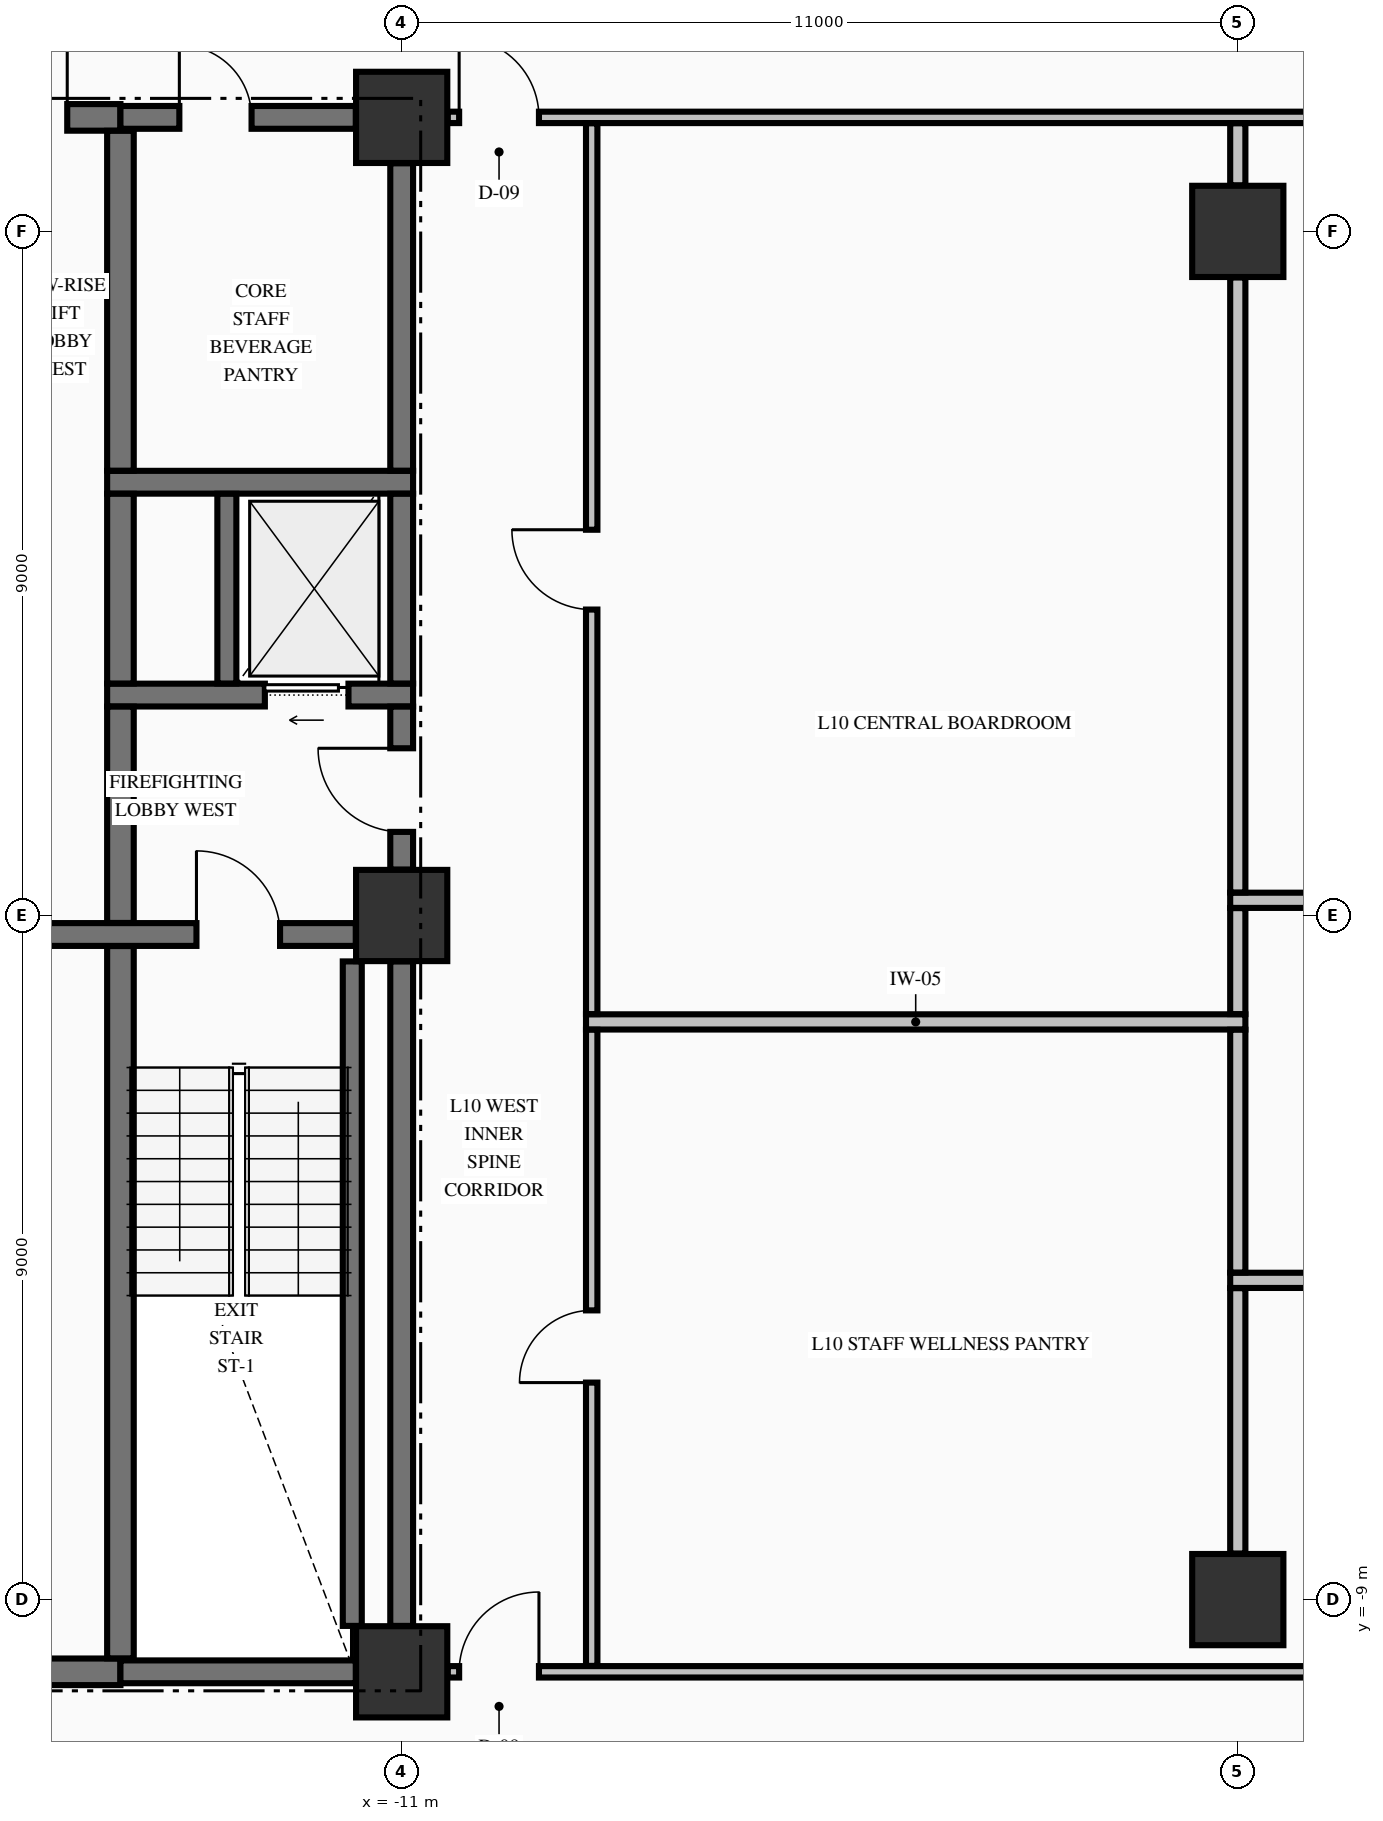
"""IFC4 building model, lengths in metres.
Left out: names, types, materials, properties, quantities, classifications, styles, units other than length and angle.
Written with IfcOpenShell. Run it as: python <this file> out.ifc"""

import sys

from ifc_helpers import new_model, si_unit, direction, frame, frame_2d, origin, origin_2d, place, context, subcontext, project, spatial, rectangle, extrude, element, fill, save


model = new_model("IFC4")
c1 = context("Model", 3, precision=1e-05, world=origin(), true_north=direction((0.0, 1.0)))
c2 = subcontext(c1, "Body", "Model", "MODEL_VIEW")
j1 = project(units=[si_unit("LENGTHUNIT", "METRE"), si_unit("PLANEANGLEUNIT", "RADIAN")], contexts=[c1])
p1 = place(None, origin())
s1 = spatial("IfcSite", under=j1, at=p1, CompositionType="ELEMENT")
p2 = place(p1, origin())
s2 = spatial("IfcBuilding", under=s1, at=p2, CompositionType="ELEMENT")
p3 = place(p2, frame((0.0, 0.0, 45.05)))
s3 = spatial("IfcBuildingStorey", under=s2, at=p3, CompositionType="ELEMENT", Elevation=45.05)
for number, where, z_axis, x_axis in (
    (1, (-11.0, -9.95, -0.25), (0.0, 0.0, 1.0), (1.0, 0.0, 0.0)),
    (2, (-11.0, 0.0, -0.25), (0.0, 0.0, 1.0), (1.0, 0.0, 0.0)),
    (3, (-11.0, 10.5, -0.25), (0.0, 0.0, 1.0), (1.0, 0.0, 0.0)),
    (4, (0.0, -9.0, -0.25), (0.0, 0.0, 1.0), (1.0, 0.0, 0.0)),
    (5, (0.0, 9.0, -0.25), (0.0, 0.0, 1.0), (1.0, 0.0, 0.0)),
):
    element("IfcColumn", number, at=place(p3, frame(where, z_axis=z_axis, x_axis=x_axis)), inside=s3, PredefinedType="COLUMN", context=c2, shape_type="SweptSolid", body=[
        extrude(rectangle(XDim=1.2, YDim=1.2, at=origin_2d()), origin(), (0.0, 0.0, 1.0), 3.57),
    ])
p4 = place(p3, frame((-19.396, -9.95, 0.0), z_axis=(0.0, 0.0, 1.0), x_axis=(1.0, 0.0, 0.0)))
e6 = element("IfcWall", 6, at=p4, inside=s3, PredefinedType="SHEAR", context=c2, shape_type="SweptSolid", body=[
    extrude(rectangle(XDim=4.696, YDim=0.35, at=frame_2d((2.348, 0.0))), origin(), (0.0, 0.0, 1.0), 3.32),
])
p5 = place(p4, frame((0.571, 0.0, 0.0)))
e7 = element("IfcOpeningElement", 7, at=p5, cuts=e6, PredefinedType="OPENING", context=c2, shape_type="SweptSolid", body=[
    extrude(rectangle(XDim=1.05, YDim=2.15, at=frame_2d((0.525, 1.075))), frame((0.0, 0.185, 0.0), z_axis=(0.0, -1.0, 0.0), x_axis=(1.0, 0.0, 0.0)), (0.0, 0.0, 1.0), 0.37),
])
p6 = place(p3, frame((-14.7, -9.95, 0.0), z_axis=(0.0, 0.0, 1.0), x_axis=(1.0, 0.0, 0.0)))
e8 = element("IfcWall", 8, at=p6, inside=s3, PredefinedType="SHEAR", context=c2, shape_type="SweptSolid", body=[
    extrude(rectangle(XDim=3.096, YDim=0.3, at=frame_2d((1.548, 0.0))), origin(), (0.0, 0.0, 1.0), 3.32),
])
p7 = place(p3, frame((-19.396, -0.25, 0.0), z_axis=(0.0, 0.0, 1.0), x_axis=(1.0, 0.0, 0.0)))
e9 = element("IfcWall", 9, at=p7, inside=s3, PredefinedType="SHEAR", context=c2, shape_type="SweptSolid", body=[
    extrude(rectangle(XDim=7.792, YDim=0.3, at=frame_2d((3.896, 0.0))), origin(), (0.0, 0.0, 1.0), 3.32),
])
p8 = place(p7, frame((5.696, 0.0, 0.0)))
e10 = element("IfcOpeningElement", 10, at=p8, cuts=e9, PredefinedType="OPENING", context=c2, shape_type="SweptSolid", body=[
    extrude(rectangle(XDim=1.1, YDim=2.15, at=frame_2d((0.55, 1.075))), frame((0.0, 0.16, 0.0), z_axis=(0.0, -1.0, 0.0), x_axis=(1.0, 0.0, 0.0)), (0.0, 0.0, 1.0), 0.32),
])
p9 = place(p3, frame((-14.875, 2.9, 0.0), z_axis=(0.0, 0.0, 1.0), x_axis=(1.0, 0.0, 0.0)))
e11 = element("IfcWall", 11, at=p9, inside=s3, PredefinedType="SHEAR", context=c2, shape_type="SweptSolid", body=[
    extrude(rectangle(XDim=4.025, YDim=0.3, at=frame_2d((2.012, 0.0))), origin(), (0.0, 0.0, 1.0), 3.32),
])
p10 = place(p9, frame((2.075, 0.0, 0.0)))
e12 = element("IfcOpeningElement", 12, at=p10, cuts=e11, PredefinedType="OPENING", context=c2, shape_type="SweptSolid", body=[
    extrude(rectangle(XDim=1.1, YDim=2.2, at=frame_2d((0.55, 1.1))), frame((0.0, 0.16, 0.0), z_axis=(0.0, -1.0, 0.0), x_axis=(1.0, 0.0, 0.0)), (0.0, 0.0, 1.0), 0.32),
])
p11 = place(p3, frame((-14.875, 5.7, 0.0), z_axis=(0.0, 0.0, 1.0), x_axis=(1.0, 0.0, 0.0)))
e13 = element("IfcWall", 13, at=p11, inside=s3, PredefinedType="SHEAR", context=c2, shape_type="SweptSolid", body=[
    extrude(rectangle(XDim=4.025, YDim=0.3, at=frame_2d((2.012, 0.0))), origin(), (0.0, 0.0, 1.0), 3.32),
])
p12 = place(p3, frame((-19.396, 10.5, 0.0), z_axis=(0.0, 0.0, 1.0), x_axis=(1.0, 0.0, 0.0)))
e14 = element("IfcWall", 14, at=p12, inside=s3, PredefinedType="SHEAR", context=c2, shape_type="SweptSolid", body=[
    extrude(rectangle(XDim=4.696, YDim=0.35, at=frame_2d((2.348, 0.0))), origin(), (0.0, 0.0, 1.0), 3.32),
])
p13 = place(p12, frame((2.796, 0.0, 0.0)))
e15 = element("IfcOpeningElement", 15, at=p13, cuts=e14, PredefinedType="OPENING", context=c2, shape_type="SweptSolid", body=[
    extrude(rectangle(XDim=1.2, YDim=2.15, at=frame_2d((0.6, 1.075))), frame((0.0, 0.185, 0.0), z_axis=(0.0, -1.0, 0.0), x_axis=(1.0, 0.0, 0.0)), (0.0, 0.0, 1.0), 0.37),
])
p14 = place(p3, frame((-14.7, 10.5, 0.0), z_axis=(0.0, 0.0, 1.0), x_axis=(1.0, 0.0, 0.0)))
e16 = element("IfcWall", 16, at=p14, inside=s3, PredefinedType="SHEAR", context=c2, shape_type="SweptSolid", body=[
    extrude(rectangle(XDim=3.096, YDim=0.3, at=frame_2d((1.548, 0.0))), origin(), (0.0, 0.0, 1.0), 3.32),
])
p15 = place(p14, frame((0.775, 0.0, 0.0)))
e17 = element("IfcOpeningElement", 17, at=p15, cuts=e16, PredefinedType="OPENING", context=c2, shape_type="SweptSolid", body=[
    extrude(rectangle(XDim=0.95, YDim=2.15, at=frame_2d((0.475, 1.075))), frame((0.0, 0.16, 0.0), z_axis=(0.0, -1.0, 0.0), x_axis=(1.0, 0.0, 0.0)), (0.0, 0.0, 1.0), 0.32),
])
p16 = place(p3, frame((-10.394, -9.95, 0.0), z_axis=(0.0, 0.0, 1.0), x_axis=(1.0, 0.0, 0.0)))
e18 = element("IfcWall", 18, at=p16, inside=s3, PredefinedType="PARTITIONING", context=c2, shape_type="SweptSolid", body=[
    extrude(rectangle(XDim=20.788, YDim=0.15, at=frame_2d((10.394, 0.0))), origin(), (0.0, 0.0, 1.0), 3.32),
])
p17 = place(p16, frame((0.15, 0.0, 0.0)))
e19 = element("IfcOpeningElement", 19, at=p17, cuts=e18, PredefinedType="OPENING", context=c2, shape_type="SweptSolid", body=[
    extrude(rectangle(XDim=1.05, YDim=2.15, at=frame_2d((0.525, 1.075))), frame((0.0, 0.085, 0.0), z_axis=(0.0, -1.0, 0.0), x_axis=(1.0, 0.0, 0.0)), (0.0, 0.0, 1.0), 0.17),
])
p18 = place(p16, frame((19.588, 0.0, 0.0)))
e20 = element("IfcOpeningElement", 20, at=p18, cuts=e18, PredefinedType="OPENING", context=c2, shape_type="SweptSolid", body=[
    extrude(rectangle(XDim=1.05, YDim=2.15, at=frame_2d((0.525, 1.075))), frame((0.0, 0.085, 0.0), z_axis=(0.0, -1.0, 0.0), x_axis=(1.0, 0.0, 0.0)), (0.0, 0.0, 1.0), 0.17),
])
p19 = place(p16, frame((12.669, 0.0, 0.0)))
e21 = element("IfcOpeningElement", 21, at=p19, cuts=e18, PredefinedType="OPENING", context=c2, shape_type="SweptSolid", body=[
    extrude(rectangle(XDim=0.95, YDim=2.15, at=frame_2d((0.475, 1.075))), frame((0.0, 0.085, 0.0), z_axis=(0.0, -1.0, 0.0), x_axis=(1.0, 0.0, 0.0)), (0.0, 0.0, 1.0), 0.17),
])
for number, where, z_axis, x_axis in (
    (22, (-0.1, -4.8, 0.0), (0.0, 0.0, 1.0), (1.0, 0.0, 0.0)),
    (23, (-8.575, -1.4, 0.0), (0.0, 0.0, 1.0), (1.0, 0.0, 0.0)),
    (24, (-0.1, 0.2, 0.0), (0.0, 0.0, 1.0), (1.0, 0.0, 0.0)),
):
    element("IfcWall", number, at=place(p3, frame(where, z_axis=z_axis, x_axis=x_axis)), inside=s3, PredefinedType="PARTITIONING", context=c2, shape_type="SweptSolid", body=[
        extrude(rectangle(XDim=8.675, YDim=0.2, at=frame_2d((4.337, 0.0))), origin(), (0.0, 0.0, 1.0), 3.32),
    ])
p20 = place(p3, frame((-10.394, 10.5, 0.0), z_axis=(0.0, 0.0, 1.0), x_axis=(1.0, 0.0, 0.0)))
e25 = element("IfcWall", 25, at=p20, inside=s3, PredefinedType="PARTITIONING", context=c2, shape_type="SweptSolid", body=[
    extrude(rectangle(XDim=20.788, YDim=0.15, at=frame_2d((10.394, 0.0))), origin(), (0.0, 0.0, 1.0), 3.32),
])
p21 = place(p20, frame((0.15, 0.0, 0.0)))
e26 = element("IfcOpeningElement", 26, at=p21, cuts=e25, PredefinedType="OPENING", context=c2, shape_type="SweptSolid", body=[
    extrude(rectangle(XDim=1.05, YDim=2.15, at=frame_2d((0.525, 1.075))), frame((0.0, 0.085, 0.0), z_axis=(0.0, -1.0, 0.0), x_axis=(1.0, 0.0, 0.0)), (0.0, 0.0, 1.0), 0.17),
])
p22 = place(p20, frame((19.588, 0.0, 0.0)))
e27 = element("IfcOpeningElement", 27, at=p22, cuts=e25, PredefinedType="OPENING", context=c2, shape_type="SweptSolid", body=[
    extrude(rectangle(XDim=1.05, YDim=2.15, at=frame_2d((0.525, 1.075))), frame((0.0, 0.085, 0.0), z_axis=(0.0, -1.0, 0.0), x_axis=(1.0, 0.0, 0.0)), (0.0, 0.0, 1.0), 0.17),
])
p23 = place(p3, frame((-14.7, -9.773, 0.0), z_axis=(0.0, 0.0, 1.0), x_axis=(0.0, 1.0, 0.0)))
e28 = element("IfcWall", 28, at=p23, inside=s3, PredefinedType="SHEAR", context=c2, shape_type="SweptSolid", body=[
    extrude(rectangle(XDim=9.371, YDim=0.35, at=frame_2d((4.686, 0.0))), origin(), (0.0, 0.0, 1.0), 3.32),
])
p24 = place(p3, frame((-14.7, -0.098, 0.0), z_axis=(0.0, 0.0, 1.0), x_axis=(0.0, 1.0, 0.0)))
e29 = element("IfcWall", 29, at=p24, inside=s3, PredefinedType="SHEAR", context=c2, shape_type="SweptSolid", body=[
    extrude(rectangle(XDim=2.846, YDim=0.35, at=frame_2d((1.423, 0.0))), origin(), (0.0, 0.0, 1.0), 3.32),
])
p25 = place(p3, frame((-14.7, 3.052, 0.0), z_axis=(0.0, 0.0, 1.0), x_axis=(0.0, 1.0, 0.0)))
e30 = element("IfcWall", 30, at=p25, inside=s3, PredefinedType="SHEAR", context=c2, shape_type="SweptSolid", body=[
    extrude(rectangle(XDim=2.496, YDim=0.35, at=frame_2d((1.248, 0.0))), origin(), (0.0, 0.0, 1.0), 3.32),
])
p26 = place(p3, frame((-14.7, 5.852, 0.0), z_axis=(0.0, 0.0, 1.0), x_axis=(0.0, 1.0, 0.0)))
e31 = element("IfcWall", 31, at=p26, inside=s3, PredefinedType="SHEAR", context=c2, shape_type="SweptSolid", body=[
    extrude(rectangle(XDim=4.471, YDim=0.35, at=frame_2d((2.235, 0.0))), origin(), (0.0, 0.0, 1.0), 3.32),
])
p27 = place(p3, frame((-13.3, 3.052, 0.0), z_axis=(0.0, 0.0, 1.0), x_axis=(0.0, 1.0, 0.0)))
e32 = element("IfcWall", 32, at=p27, inside=s3, PredefinedType="SOLIDWALL", context=c2, shape_type="SweptSolid", body=[
    extrude(rectangle(XDim=2.496, YDim=0.25, at=frame_2d((1.248, 0.0))), origin(), (0.0, 0.0, 1.0), 3.32),
])
p28 = place(p3, frame((-11.65, -9.346, 0.0), z_axis=(0.0, 0.0, 1.0), x_axis=(0.0, 1.0, 0.0)))
e33 = element("IfcWall", 33, at=p28, inside=s3, PredefinedType="SOLIDWALL", context=c2, shape_type="SweptSolid", body=[
    extrude(rectangle(XDim=8.742, YDim=0.25, at=frame_2d((4.371, 0.0))), origin(), (0.0, 0.0, 1.0), 3.32),
])
p29 = place(p3, frame((-11.0, -9.346, 0.0), z_axis=(0.0, 0.0, 1.0), x_axis=(0.0, 1.0, 0.0)))
e34 = element("IfcWall", 34, at=p29, inside=s3, PredefinedType="SHEAR", context=c2, shape_type="SweptSolid", body=[
    extrude(rectangle(XDim=8.742, YDim=0.3, at=frame_2d((4.371, 0.0))), origin(), (0.0, 0.0, 1.0), 3.32),
])
p30 = place(p3, frame((-11.0, 0.604, 0.0), z_axis=(0.0, 0.0, 1.0), x_axis=(0.0, 1.0, 0.0)))
e35 = element("IfcWall", 35, at=p30, inside=s3, PredefinedType="SHEAR", context=c2, shape_type="SweptSolid", body=[
    extrude(rectangle(XDim=2.144, YDim=0.3, at=frame_2d((1.072, 0.0))), origin(), (0.0, 0.0, 1.0), 3.32),
])
p31 = place(p30, frame((0.496, 0.0, 0.0)))
e36 = element("IfcOpeningElement", 36, at=p31, cuts=e35, PredefinedType="OPENING", context=c2, shape_type="SweptSolid", body=[
    extrude(rectangle(XDim=1.1, YDim=2.15, at=frame_2d((0.55, 1.075))), frame((0.0, 0.16, 0.0), z_axis=(0.0, -1.0, 0.0), x_axis=(1.0, 0.0, 0.0)), (0.0, 0.0, 1.0), 0.32),
])
p32 = place(p3, frame((-11.0, 3.052, 0.0), z_axis=(0.0, 0.0, 1.0), x_axis=(0.0, 1.0, 0.0)))
e37 = element("IfcWall", 37, at=p32, inside=s3, PredefinedType="SHEAR", context=c2, shape_type="SweptSolid", body=[
    extrude(rectangle(XDim=2.496, YDim=0.3, at=frame_2d((1.248, 0.0))), origin(), (0.0, 0.0, 1.0), 3.32),
])
p33 = place(p3, frame((-11.0, 5.852, 0.0), z_axis=(0.0, 0.0, 1.0), x_axis=(0.0, 1.0, 0.0)))
e38 = element("IfcWall", 38, at=p33, inside=s3, PredefinedType="SHEAR", context=c2, shape_type="SweptSolid", body=[
    extrude(rectangle(XDim=4.044, YDim=0.3, at=frame_2d((2.022, 0.0))), origin(), (0.0, 0.0, 1.0), 3.32),
])
p34 = place(p3, frame((-8.5, -9.872, 0.0), z_axis=(0.0, 0.0, 1.0), x_axis=(0.0, 1.0, 0.0)))
e39 = element("IfcWall", 39, at=p34, inside=s3, PredefinedType="PARTITIONING", context=c2, shape_type="SweptSolid", body=[
    extrude(rectangle(XDim=8.369, YDim=0.15, at=frame_2d((4.185, 0.0))), origin(), (0.0, 0.0, 1.0), 3.32),
])
p35 = place(p34, frame((3.727, 0.0, 0.0)))
e40 = element("IfcOpeningElement", 40, at=p35, cuts=e39, PredefinedType="OPENING", context=c2, shape_type="SweptSolid", body=[
    extrude(rectangle(XDim=0.95, YDim=2.15, at=frame_2d((0.475, 1.075))), frame((0.0, 0.085, 0.0), z_axis=(0.0, -1.0, 0.0), x_axis=(1.0, 0.0, 0.0)), (0.0, 0.0, 1.0), 0.17),
])
p36 = place(p3, frame((-8.5, -1.297, 0.0), z_axis=(0.0, 0.0, 1.0), x_axis=(0.0, 1.0, 0.0)))
e41 = element("IfcWall", 41, at=p36, inside=s3, PredefinedType="PARTITIONING", context=c2, shape_type="SweptSolid", body=[
    extrude(rectangle(XDim=11.719, YDim=0.15, at=frame_2d((5.86, 0.0))), origin(), (0.0, 0.0, 1.0), 3.32),
])
p37 = place(p36, frame((5.322, 0.0, 0.0)))
e42 = element("IfcOpeningElement", 42, at=p37, cuts=e41, PredefinedType="OPENING", context=c2, shape_type="SweptSolid", body=[
    extrude(rectangle(XDim=1.05, YDim=2.15, at=frame_2d((0.525, 1.075))), frame((0.0, 0.085, 0.0), z_axis=(0.0, -1.0, 0.0), x_axis=(1.0, 0.0, 0.0)), (0.0, 0.0, 1.0), 0.17),
])
p38 = place(p3, frame((0.0, -8.394, 0.0), z_axis=(0.0, 0.0, 1.0), x_axis=(0.0, 1.0, 0.0)))
e43 = element("IfcWall", 43, at=p38, inside=s3, PredefinedType="PARTITIONING", context=c2, shape_type="SweptSolid", body=[
    extrude(rectangle(XDim=3.491, YDim=0.2, at=frame_2d((1.746, 0.0))), origin(), (0.0, 0.0, 1.0), 2.66),
])
p39 = place(p3, frame((0.0, -4.697, 0.0), z_axis=(0.0, 0.0, 1.0), x_axis=(0.0, 1.0, 0.0)))
e44 = element("IfcWall", 44, at=p39, inside=s3, PredefinedType="PARTITIONING", context=c2, shape_type="SweptSolid", body=[
    extrude(rectangle(XDim=3.194, YDim=0.2, at=frame_2d((1.597, 0.0))), origin(), (0.0, 0.0, 1.0), 2.66),
])
p40 = place(p3, frame((0.0, -1.297, 0.0), z_axis=(0.0, 0.0, 1.0), x_axis=(0.0, 1.0, 0.0)))
e45 = element("IfcWall", 45, at=p40, inside=s3, PredefinedType="PARTITIONING", context=c2, shape_type="SweptSolid", body=[
    extrude(rectangle(XDim=1.394, YDim=0.2, at=frame_2d((0.697, 0.0))), origin(), (0.0, 0.0, 1.0), 2.66),
])
p41 = place(p3, frame((0.0, 0.303, 0.0), z_axis=(0.0, 0.0, 1.0), x_axis=(0.0, 1.0, 0.0)))
e46 = element("IfcWall", 46, at=p41, inside=s3, PredefinedType="PARTITIONING", context=c2, shape_type="SweptSolid", body=[
    extrude(rectangle(XDim=8.091, YDim=0.2, at=frame_2d((4.045, 0.0))), origin(), (0.0, 0.0, 1.0), 2.66),
])
p42 = place(p3, frame((0.0, 9.606, 0.0), z_axis=(0.0, 0.0, 1.0), x_axis=(0.0, 1.0, 0.0)))
e47 = element("IfcWall", 47, at=p42, inside=s3, PredefinedType="PARTITIONING", context=c2, shape_type="SweptSolid", body=[
    extrude(rectangle(XDim=0.816, YDim=0.2, at=frame_2d((0.408, 0.0))), origin(), (0.0, 0.0, 1.0), 2.66),
])
p43 = place(p8, origin())
e48 = element("IfcDoor", 48, at=p43, inside=s3, OperationType="SINGLE_SWING_LEFT", PredefinedType="DOOR", context=c2, shape_type="SweptSolid", body=[
    extrude(rectangle(XDim=1.1, YDim=2.15, at=frame_2d((0.55, 1.075))), frame((0.0, 0.025, 0.0), z_axis=(0.0, -1.0, 0.0), x_axis=(1.0, 0.0, 0.0)), (0.0, 0.0, 1.0), 0.05),
])
fill(e10, e48)
p44 = place(p31, origin())
e49 = element("IfcDoor", 49, at=p44, inside=s3, OperationType="SINGLE_SWING_RIGHT", PredefinedType="DOOR", context=c2, shape_type="SweptSolid", body=[
    extrude(rectangle(XDim=1.1, YDim=2.15, at=frame_2d((0.55, 1.075))), frame((0.0, 0.025, 0.0), z_axis=(0.0, -1.0, 0.0), x_axis=(1.0, 0.0, 0.0)), (0.0, 0.0, 1.0), 0.05),
])
fill(e36, e49)
p45 = place(p10, origin())
e50 = element("IfcDoor", 50, at=p45, inside=s3, OperationType="SLIDING_TO_LEFT", PredefinedType="DOOR", context=c2, shape_type="SweptSolid", body=[
    extrude(rectangle(XDim=1.1, YDim=2.2, at=frame_2d((0.55, 1.1))), frame((0.0, 0.025, 0.0), z_axis=(0.0, -1.0, 0.0), x_axis=(1.0, 0.0, 0.0)), (0.0, 0.0, 1.0), 0.05),
])
fill(e12, e50)
p46 = place(p15, origin())
e51 = element("IfcDoor", 51, at=p46, inside=s3, OperationType="SINGLE_SWING_LEFT", PredefinedType="DOOR", context=c2, shape_type="SweptSolid", body=[
    extrude(rectangle(XDim=0.95, YDim=2.15, at=frame_2d((0.475, 1.075))), frame((0.0, 0.025, 0.0), z_axis=(0.0, -1.0, 0.0), x_axis=(1.0, 0.0, 0.0)), (0.0, 0.0, 1.0), 0.05),
])
fill(e17, e51)
p47 = place(p13, origin())
e52 = element("IfcDoor", 52, at=p47, inside=s3, OperationType="SINGLE_SWING_RIGHT", PredefinedType="DOOR", context=c2, shape_type="SweptSolid", body=[
    extrude(rectangle(XDim=1.2, YDim=2.15, at=frame_2d((0.6, 1.075))), frame((0.0, 0.025, 0.0), z_axis=(0.0, -1.0, 0.0), x_axis=(1.0, 0.0, 0.0)), (0.0, 0.0, 1.0), 0.05),
])
fill(e15, e52)
p48 = place(p21, origin())
e53 = element("IfcDoor", 53, at=p48, inside=s3, OperationType="SINGLE_SWING_LEFT", PredefinedType="DOOR", context=c2, shape_type="SweptSolid", body=[
    extrude(rectangle(XDim=1.05, YDim=2.15, at=frame_2d((0.525, 1.075))), frame((0.0, 0.025, 0.0), z_axis=(0.0, -1.0, 0.0), x_axis=(1.0, 0.0, 0.0)), (0.0, 0.0, 1.0), 0.05),
])
fill(e26, e53)
p49 = place(p17, origin())
e54 = element("IfcDoor", 54, at=p49, inside=s3, OperationType="SINGLE_SWING_RIGHT", PredefinedType="DOOR", context=c2, shape_type="SweptSolid", body=[
    extrude(rectangle(XDim=1.05, YDim=2.15, at=frame_2d((0.525, 1.075))), frame((0.0, 0.025, 0.0), z_axis=(0.0, -1.0, 0.0), x_axis=(1.0, 0.0, 0.0)), (0.0, 0.0, 1.0), 0.05),
])
fill(e19, e54)
p50 = place(p37, origin())
e55 = element("IfcDoor", 55, at=p50, inside=s3, OperationType="SINGLE_SWING_RIGHT", PredefinedType="DOOR", context=c2, shape_type="SweptSolid", body=[
    extrude(rectangle(XDim=1.05, YDim=2.15, at=frame_2d((0.525, 1.075))), frame((0.0, 0.025, 0.0), z_axis=(0.0, -1.0, 0.0), x_axis=(1.0, 0.0, 0.0)), (0.0, 0.0, 1.0), 0.05),
])
fill(e42, e55)
p51 = place(p35, origin())
e56 = element("IfcDoor", 56, at=p51, inside=s3, OperationType="SINGLE_SWING_LEFT", PredefinedType="DOOR", context=c2, shape_type="SweptSolid", body=[
    extrude(rectangle(XDim=0.95, YDim=2.15, at=frame_2d((0.475, 1.075))), frame((0.0, 0.025, 0.0), z_axis=(0.0, -1.0, 0.0), x_axis=(1.0, 0.0, 0.0)), (0.0, 0.0, 1.0), 0.05),
])
fill(e40, e56)
save(model, sys.argv[1])
